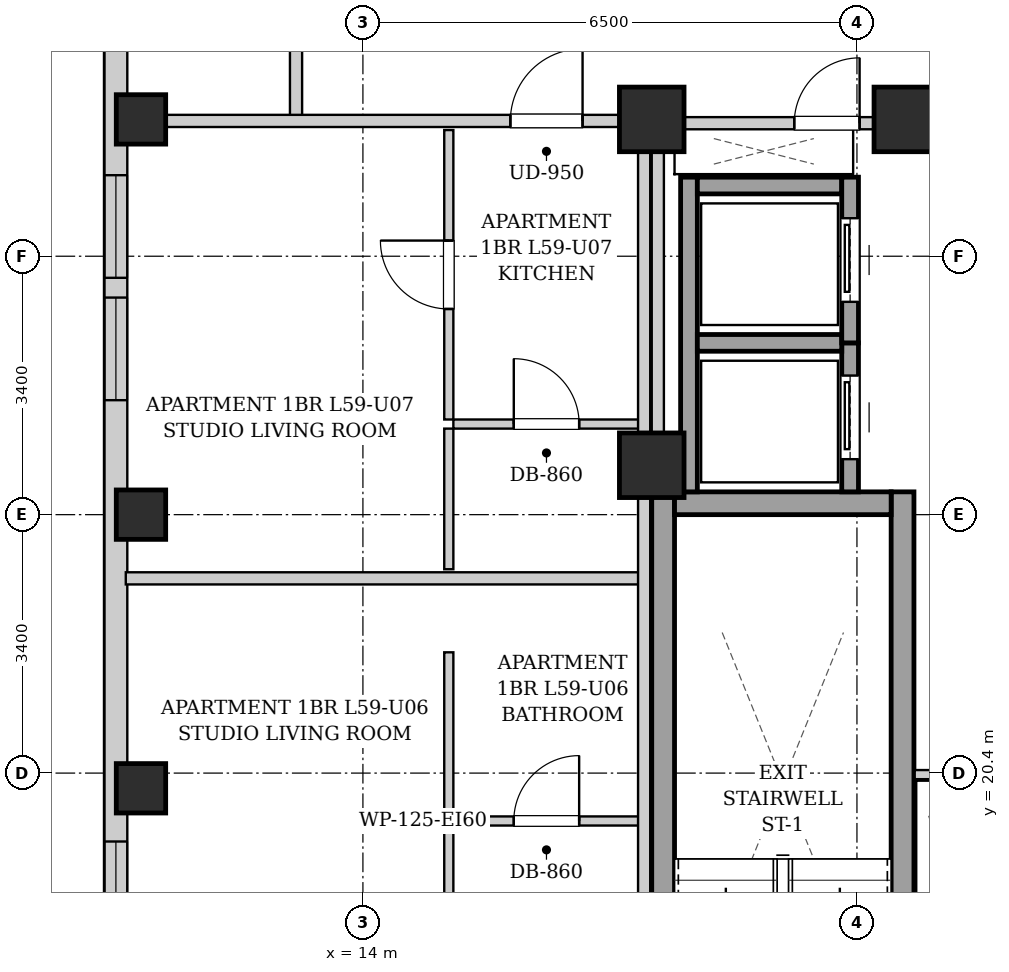
"""IFC4 building model, lengths in metres.
Left out: names, types, materials, properties, quantities, classifications, styles, units other than length and angle.
Written with IfcOpenShell. Run it as: python <this file> out.ifc"""

import sys

from ifc_helpers import new_model, si_unit, direction, frame, frame_2d, origin, origin_2d, place, context, subcontext, project, spatial, rectangle, extrude, element, fill, save


model = new_model("IFC4")
c1 = context("Model", 3, precision=1e-05, world=origin(), true_north=direction((0.0, 1.0)))
c2 = subcontext(c1, "Body", "Model", "MODEL_VIEW")
j1 = project(units=[si_unit("LENGTHUNIT", "METRE"), si_unit("PLANEANGLEUNIT", "RADIAN")], contexts=[c1])
p1 = place(None, origin())
s1 = spatial("IfcSite", under=j1, at=p1, CompositionType="ELEMENT")
p2 = place(p1, origin())
s2 = spatial("IfcBuilding", under=s1, at=p2, CompositionType="ELEMENT")
p3 = place(p2, frame((0.0, 0.0, 204.1)))
s3 = spatial("IfcBuildingStorey", under=s2, at=p3, CompositionType="ELEMENT", Elevation=204.1)
for number, where, z_axis, x_axis in (
    (1, (11.08, 20.2, 0.0), (0.0, 0.0, 1.0), (1.0, 0.0, 0.0)),
    (2, (11.08, 23.8, 0.0), (0.0, 0.0, 1.0), (1.0, 0.0, 0.0)),
    (3, (11.08, 29.0, 0.0), (0.0, 0.0, 1.0), (1.0, 0.0, 0.0)),
):
    element("IfcColumn", number, at=place(p3, frame(where, z_axis=z_axis, x_axis=x_axis)), inside=s3, PredefinedType="COLUMN", context=c2, shape_type="SweptSolid", body=[
        extrude(rectangle(XDim=0.65, YDim=0.65, at=origin_2d()), origin(), (0.0, 0.0, 1.0), 3.3),
    ])
for number, where, z_axis, x_axis in (
    (4, (17.8, 29.0, 0.0), (0.0, 0.0, 1.0), (1.0, 0.0, 0.0)),
    (5, (21.15, 29.0, 0.0), (0.0, 0.0, 1.0), (1.0, 0.0, 0.0)),
    (6, (17.8, 24.45, 0.0), (0.0, 0.0, 1.0), (1.0, 0.0, 0.0)),
):
    element("IfcColumn", number, at=place(p3, frame(where, z_axis=z_axis, x_axis=x_axis)), inside=s3, PredefinedType="COLUMN", context=c2, shape_type="SweptSolid", body=[
        extrude(rectangle(XDim=0.85, YDim=0.85, at=origin_2d()), origin(), (0.0, 0.0, 1.0), 3.3),
    ])
p4 = place(p3, frame((10.75, 6.3, 0.0), z_axis=(0.0, 0.0, 1.0), x_axis=(0.0, 1.0, 0.0)))
e7 = element("IfcWall", 7, at=p4, inside=s3, PredefinedType="SOLIDWALL", context=c2, shape_type="SweptSolid", body=[
    extrude(rectangle(XDim=31.4, YDim=0.3, at=frame_2d((15.7, 0.0))), origin(), (0.0, 0.0, 1.0), 3.04),
])
p5 = place(p4, frame((1.504, 0.0, 0.55)))
e8 = element("IfcOpeningElement", 8, at=p5, cuts=e7, PredefinedType="OPENING", context=c2, shape_type="SweptSolid", body=[
    extrude(rectangle(XDim=1.35, YDim=1.2, at=frame_2d((0.675, 0.6))), frame((0.0, 0.16, 0.0), z_axis=(0.0, -1.0, 0.0), x_axis=(1.0, 0.0, 0.0)), (0.0, 0.0, 1.0), 0.32),
])
p6 = place(p4, frame((28.546, 0.0, 0.55)))
e9 = element("IfcOpeningElement", 9, at=p6, cuts=e7, PredefinedType="OPENING", context=c2, shape_type="SweptSolid", body=[
    extrude(rectangle(XDim=1.35, YDim=1.2, at=frame_2d((0.675, 0.6))), frame((0.0, 0.16, 0.0), z_axis=(0.0, -1.0, 0.0), x_axis=(1.0, 0.0, 0.0)), (0.0, 0.0, 1.0), 0.32),
])
p7 = place(p4, frame((11.85, 0.0, 0.55)))
e10 = element("IfcOpeningElement", 10, at=p7, cuts=e7, PredefinedType="OPENING", context=c2, shape_type="SweptSolid", body=[
    extrude(rectangle(XDim=1.35, YDim=1.2, at=frame_2d((0.675, 0.6))), frame((0.0, 0.16, 0.0), z_axis=(0.0, -1.0, 0.0), x_axis=(1.0, 0.0, 0.0)), (0.0, 0.0, 1.0), 0.32),
])
p8 = place(p4, frame((9.185, 0.0, 0.55)))
e11 = element("IfcOpeningElement", 11, at=p8, cuts=e7, PredefinedType="OPENING", context=c2, shape_type="SweptSolid", body=[
    extrude(rectangle(XDim=1.35, YDim=1.2, at=frame_2d((0.675, 0.6))), frame((0.0, 0.16, 0.0), z_axis=(0.0, -1.0, 0.0), x_axis=(1.0, 0.0, 0.0)), (0.0, 0.0, 1.0), 0.32),
])
p9 = place(p4, frame((19.006, 0.0, 0.55)))
e12 = element("IfcOpeningElement", 12, at=p9, cuts=e7, PredefinedType="OPENING", context=c2, shape_type="SweptSolid", body=[
    extrude(rectangle(XDim=1.35, YDim=1.2, at=frame_2d((0.675, 0.6))), frame((0.0, 0.16, 0.0), z_axis=(0.0, -1.0, 0.0), x_axis=(1.0, 0.0, 0.0)), (0.0, 0.0, 1.0), 0.32),
])
p10 = place(p4, frame((20.616, 0.0, 0.55)))
e13 = element("IfcOpeningElement", 13, at=p10, cuts=e7, PredefinedType="OPENING", context=c2, shape_type="SweptSolid", body=[
    extrude(rectangle(XDim=1.35, YDim=1.2, at=frame_2d((0.675, 0.6))), frame((0.0, 0.16, 0.0), z_axis=(0.0, -1.0, 0.0), x_axis=(1.0, 0.0, 0.0)), (0.0, 0.0, 1.0), 0.32),
])
for number, where, z_axis, x_axis in (
    (14, (17.95, 15.1, 0.0), (0.0, 0.0, 1.0), (0.0, 1.0, 0.0)),
    (15, (21.1, 15.1, 0.0), (0.0, 0.0, 1.0), (0.0, 1.0, 0.0)),
):
    element("IfcWall", number, at=place(p3, frame(where, z_axis=z_axis, x_axis=x_axis)), inside=s3, PredefinedType="SHEAR", context=c2, shape_type="SweptSolid", body=[
        extrude(rectangle(XDim=9.0, YDim=0.3, at=frame_2d((4.5, 0.0))), origin(), (0.0, 0.0, 1.0), 3.04),
    ])
p11 = place(p3, frame((18.1, 23.95, 0.0), z_axis=(0.0, 0.0, 1.0), x_axis=(1.0, 0.0, 0.0)))
e16 = element("IfcWall", 16, at=p11, inside=s3, PredefinedType="SHEAR", context=c2, shape_type="SweptSolid", body=[
    extrude(rectangle(XDim=2.85, YDim=0.3, at=frame_2d((1.425, 0.0))), origin(), (0.0, 0.0, 1.0), 3.04),
])
p12 = place(p3, frame((18.29, 24.1, 0.0), z_axis=(0.0, 0.0, 1.0), x_axis=(0.0, 1.0, 0.0)))
e17 = element("IfcWall", 17, at=p12, inside=s3, PredefinedType="SHEAR", context=c2, shape_type="SweptSolid", body=[
    extrude(rectangle(XDim=4.14, YDim=0.22, at=frame_2d((2.07, 0.0))), origin(), (0.0, 0.0, 1.0), 3.04),
])
p13 = place(p3, frame((20.41, 24.1, 0.0), z_axis=(0.0, 0.0, 1.0), x_axis=(0.0, 1.0, 0.0)))
e18 = element("IfcWall", 18, at=p13, inside=s3, PredefinedType="SHEAR", context=c2, shape_type="SweptSolid", body=[
    extrude(rectangle(XDim=1.96, YDim=0.22, at=frame_2d((0.98, 0.0))), origin(), (0.0, 0.0, 1.0), 3.04),
])
p14 = place(p13, frame((0.43, 0.0, 0.0)))
e19 = element("IfcOpeningElement", 19, at=p14, cuts=e18, PredefinedType="OPENING", context=c2, shape_type="SweptSolid", body=[
    extrude(rectangle(XDim=1.1, YDim=2.15, at=frame_2d((0.55, 1.075))), frame((0.0, 0.12, 0.0), z_axis=(0.0, -1.0, 0.0), x_axis=(1.0, 0.0, 0.0)), (0.0, 0.0, 1.0), 0.24),
])
for number, where, z_axis, x_axis in (
    (20, (18.4, 26.06, 0.0), (0.0, 0.0, 1.0), (1.0, 0.0, 0.0)),
    (21, (18.4, 28.13, 0.0), (0.0, 0.0, 1.0), (1.0, 0.0, 0.0)),
):
    element("IfcWall", number, at=place(p3, frame(where, z_axis=z_axis, x_axis=x_axis)), inside=s3, PredefinedType="SHEAR", context=c2, shape_type="SweptSolid", body=[
        extrude(rectangle(XDim=1.9, YDim=0.22, at=frame_2d((0.95, 0.0))), origin(), (0.0, 0.0, 1.0), 3.04),
    ])
p15 = place(p3, frame((20.41, 26.06, 0.0), z_axis=(0.0, 0.0, 1.0), x_axis=(0.0, 1.0, 0.0)))
e22 = element("IfcWall", 22, at=p15, inside=s3, PredefinedType="SHEAR", context=c2, shape_type="SweptSolid", body=[
    extrude(rectangle(XDim=2.18, YDim=0.22, at=frame_2d((1.09, 0.0))), origin(), (0.0, 0.0, 1.0), 3.04),
])
p16 = place(p15, frame((0.54, 0.0, 0.0)))
e23 = element("IfcOpeningElement", 23, at=p16, cuts=e22, PredefinedType="OPENING", context=c2, shape_type="SweptSolid", body=[
    extrude(rectangle(XDim=1.1, YDim=2.15, at=frame_2d((0.55, 1.075))), frame((0.0, 0.12, 0.0), z_axis=(0.0, -1.0, 0.0), x_axis=(1.0, 0.0, 0.0)), (0.0, 0.0, 1.0), 0.24),
])
p17 = place(p3, frame((17.88, 24.12, 0.0), z_axis=(0.0, 0.0, 1.0), x_axis=(0.0, 1.0, 0.0)))
e24 = element("IfcWall", 24, at=p17, inside=s3, PredefinedType="PARTITIONING", context=c2, shape_type="SweptSolid", body=[
    extrude(rectangle(XDim=4.76, YDim=0.16, at=frame_2d((2.38, 0.0))), origin(), (0.0, 0.0, 1.0), 3.04),
])
p18 = place(p3, frame((17.96, 28.95, 0.0), z_axis=(0.0, 0.0, 1.0), x_axis=(1.0, 0.0, 0.0)))
e25 = element("IfcWall", 25, at=p18, inside=s3, PredefinedType="PARTITIONING", context=c2, shape_type="SweptSolid", body=[
    extrude(rectangle(XDim=4.29, YDim=0.16, at=frame_2d((2.145, 0.0))), origin(), (0.0, 0.0, 1.0), 2.556),
])
p19 = place(p18, frame((1.715, 0.0, 0.0)))
e26 = element("IfcOpeningElement", 26, at=p19, cuts=e25, PredefinedType="OPENING", context=c2, shape_type="SweptSolid", body=[
    extrude(rectangle(XDim=0.86, YDim=2.05, at=frame_2d((0.43, 1.025))), frame((0.0, 0.09, 0.0), z_axis=(0.0, -1.0, 0.0), x_axis=(1.0, 0.0, 0.0)), (0.0, 0.0, 1.0), 0.18),
])
p20 = place(p3, frame((22.28, 20.38, 0.0), z_axis=(0.0, 0.0, 1.0), x_axis=(-1.0, 0.0, 0.0)))
e27 = element("IfcWall", 27, at=p20, inside=s3, PredefinedType="PARTITIONING", context=c2, shape_type="SweptSolid", body=[
    extrude(rectangle(XDim=1.02, YDim=0.12, at=frame_2d((0.51, 0.0))), origin(), (0.0, 0.0, 1.0), 3.04),
])
p21 = place(p3, frame((13.12, 28.98, 0.0), z_axis=(0.0, 0.0, 1.0), x_axis=(0.0, 1.0, 0.0)))
e28 = element("IfcWall", 28, at=p21, inside=s3, PredefinedType="PARTITIONING", context=c2, shape_type="SweptSolid", body=[
    extrude(rectangle(XDim=1.58, YDim=0.16, at=frame_2d((0.79, 0.0))), origin(), (0.0, 0.0, 1.0), 3.04),
])
p22 = place(p3, frame((10.88, 22.962, 0.0), z_axis=(0.0, 0.0, 1.0), x_axis=(1.0, 0.0, 0.0)))
e29 = element("IfcWall", 29, at=p22, inside=s3, PredefinedType="PARTITIONING", context=c2, shape_type="SweptSolid", body=[
    extrude(rectangle(XDim=6.76, YDim=0.16, at=frame_2d((3.38, 0.0))), origin(), (0.0, 0.0, 1.0), 3.04),
])
p23 = place(p3, frame((15.19, 19.77, 0.0), z_axis=(0.0, 0.0, 1.0), x_axis=(1.0, 0.0, 0.0)))
e30 = element("IfcWall", 30, at=p23, inside=s3, PredefinedType="PARTITIONING", context=c2, shape_type="SweptSolid", body=[
    extrude(rectangle(XDim=2.45, YDim=0.12, at=frame_2d((1.225, 0.0))), origin(), (0.0, 0.0, 1.0), 3.04),
])
p24 = place(p23, frame((0.795, 0.0, 0.0)))
e31 = element("IfcOpeningElement", 31, at=p24, cuts=e30, PredefinedType="OPENING", context=c2, shape_type="SweptSolid", body=[
    extrude(rectangle(XDim=0.86, YDim=2.05, at=frame_2d((0.43, 1.025))), frame((0.0, 0.07, 0.0), z_axis=(0.0, -1.0, 0.0), x_axis=(1.0, 0.0, 0.0)), (0.0, 0.0, 1.0), 0.14),
])
p25 = place(p3, frame((15.13, 19.83, 0.0), z_axis=(0.0, 0.0, 1.0), x_axis=(0.0, 1.0, 0.0)))
e32 = element("IfcWall", 32, at=p25, inside=s3, PredefinedType="PARTITIONING", context=c2, shape_type="SweptSolid", body=[
    extrude(rectangle(XDim=2.159, YDim=0.12, at=frame_2d((1.08, 0.0))), origin(), (0.0, 0.0, 1.0), 3.04),
])
p26 = place(p3, frame((15.13, 15.21, 0.0), z_axis=(0.0, 0.0, 1.0), x_axis=(0.0, 1.0, 0.0)))
e33 = element("IfcWall", 33, at=p26, inside=s3, PredefinedType="PARTITIONING", context=c2, shape_type="SweptSolid", body=[
    extrude(rectangle(XDim=4.5, YDim=0.12, at=frame_2d((2.25, 0.0))), origin(), (0.0, 0.0, 1.0), 3.04),
])
p27 = place(p26, frame((1.8, 0.0, 0.0)))
e34 = element("IfcOpeningElement", 34, at=p27, cuts=e33, PredefinedType="OPENING", context=c2, shape_type="SweptSolid", body=[
    extrude(rectangle(XDim=0.9, YDim=2.05, at=frame_2d((0.45, 1.025))), frame((0.0, 0.07, 0.0), z_axis=(0.0, -1.0, 0.0), x_axis=(1.0, 0.0, 0.0)), (0.0, 0.0, 1.0), 0.14),
])
p28 = place(p3, frame((10.88, 28.98, 0.0), z_axis=(0.0, 0.0, 1.0), x_axis=(1.0, 0.0, 0.0)))
e35 = element("IfcWall", 35, at=p28, inside=s3, PredefinedType="PARTITIONING", context=c2, shape_type="SweptSolid", body=[
    extrude(rectangle(XDim=6.88, YDim=0.16, at=frame_2d((3.44, 0.0))), origin(), (0.0, 0.0, 1.0), 2.556),
])
p29 = place(p28, frame((5.06, 0.0, 0.0)))
e36 = element("IfcOpeningElement", 36, at=p29, cuts=e35, PredefinedType="OPENING", context=c2, shape_type="SweptSolid", body=[
    extrude(rectangle(XDim=0.95, YDim=2.1, at=frame_2d((0.475, 1.05))), frame((0.0, 0.09, 0.0), z_axis=(0.0, -1.0, 0.0), x_axis=(1.0, 0.0, 0.0)), (0.0, 0.0, 1.0), 0.18),
])
p30 = place(p3, frame((15.19, 24.992, 0.0), z_axis=(0.0, 0.0, 1.0), x_axis=(1.0, 0.0, 0.0)))
e37 = element("IfcWall", 37, at=p30, inside=s3, PredefinedType="PARTITIONING", context=c2, shape_type="SweptSolid", body=[
    extrude(rectangle(XDim=2.45, YDim=0.12, at=frame_2d((1.225, 0.0))), origin(), (0.0, 0.0, 1.0), 3.04),
])
p31 = place(p30, frame((0.795, 0.0, 0.0)))
e38 = element("IfcOpeningElement", 38, at=p31, cuts=e37, PredefinedType="OPENING", context=c2, shape_type="SweptSolid", body=[
    extrude(rectangle(XDim=0.86, YDim=2.05, at=frame_2d((0.43, 1.025))), frame((0.0, 0.07, 0.0), z_axis=(0.0, -1.0, 0.0), x_axis=(1.0, 0.0, 0.0)), (0.0, 0.0, 1.0), 0.14),
])
p32 = place(p3, frame((15.13, 23.082, 0.0), z_axis=(0.0, 0.0, 1.0), x_axis=(0.0, 1.0, 0.0)))
e39 = element("IfcWall", 39, at=p32, inside=s3, PredefinedType="PARTITIONING", context=c2, shape_type="SweptSolid", body=[
    extrude(rectangle(XDim=1.85, YDim=0.12, at=frame_2d((0.925, 0.0))), origin(), (0.0, 0.0, 1.0), 3.04),
])
p33 = place(p3, frame((15.13, 25.052, 0.0), z_axis=(0.0, 0.0, 1.0), x_axis=(0.0, 1.0, 0.0)))
e40 = element("IfcWall", 40, at=p33, inside=s3, PredefinedType="PARTITIONING", context=c2, shape_type="SweptSolid", body=[
    extrude(rectangle(XDim=3.808, YDim=0.12, at=frame_2d((1.904, 0.0))), origin(), (0.0, 0.0, 1.0), 3.04),
])
p34 = place(p33, frame((1.454, 0.0, 0.0)))
e41 = element("IfcOpeningElement", 41, at=p34, cuts=e40, PredefinedType="OPENING", context=c2, shape_type="SweptSolid", body=[
    extrude(rectangle(XDim=0.9, YDim=2.05, at=frame_2d((0.45, 1.025))), frame((0.0, 0.07, 0.0), z_axis=(0.0, -1.0, 0.0), x_axis=(1.0, 0.0, 0.0)), (0.0, 0.0, 1.0), 0.14),
])
p35 = place(p3, frame((17.7, 15.02, 0.0), z_axis=(0.0, 0.0, 1.0), x_axis=(0.0, 1.0, 0.0)))
e42 = element("IfcWall", 42, at=p35, inside=s3, PredefinedType="PARTITIONING", context=c2, shape_type="SweptSolid", body=[
    extrude(rectangle(XDim=13.98, YDim=0.16, at=frame_2d((6.99, 0.0))), origin(), (0.0, 0.0, 1.0), 3.04),
])
p36 = place(p14, origin())
e43 = element("IfcDoor", 43, at=p36, inside=s3, OperationType="SLIDING_TO_LEFT", PredefinedType="DOOR", context=c2, shape_type="SweptSolid", body=[
    extrude(rectangle(XDim=1.1, YDim=2.15, at=frame_2d((0.55, 1.075))), frame((0.0, 0.025, 0.0), z_axis=(0.0, -1.0, 0.0), x_axis=(1.0, 0.0, 0.0)), (0.0, 0.0, 1.0), 0.05),
])
fill(e19, e43)
p37 = place(p16, origin())
e44 = element("IfcDoor", 44, at=p37, inside=s3, OperationType="SLIDING_TO_LEFT", PredefinedType="DOOR", context=c2, shape_type="SweptSolid", body=[
    extrude(rectangle(XDim=1.1, YDim=2.15, at=frame_2d((0.55, 1.075))), frame((0.0, 0.025, 0.0), z_axis=(0.0, -1.0, 0.0), x_axis=(1.0, 0.0, 0.0)), (0.0, 0.0, 1.0), 0.05),
])
fill(e23, e44)
p38 = place(p19, origin())
e45 = element("IfcDoor", 45, at=p38, inside=s3, OperationType="SINGLE_SWING_RIGHT", PredefinedType="DOOR", context=c2, shape_type="SweptSolid", body=[
    extrude(rectangle(XDim=0.86, YDim=2.05, at=frame_2d((0.43, 1.025))), frame((0.0, 0.025, 0.0), z_axis=(0.0, -1.0, 0.0), x_axis=(1.0, 0.0, 0.0)), (0.0, 0.0, 1.0), 0.05),
])
fill(e26, e45)
p39 = place(p24, origin())
e46 = element("IfcDoor", 46, at=p39, inside=s3, OperationType="SINGLE_SWING_RIGHT", PredefinedType="DOOR", context=c2, shape_type="SweptSolid", body=[
    extrude(rectangle(XDim=0.86, YDim=2.05, at=frame_2d((0.43, 1.025))), frame((0.0, 0.025, 0.0), z_axis=(0.0, -1.0, 0.0), x_axis=(1.0, 0.0, 0.0)), (0.0, 0.0, 1.0), 0.05),
])
fill(e31, e46)
p40 = place(p29, origin())
e47 = element("IfcDoor", 47, at=p40, inside=s3, OperationType="SINGLE_SWING_RIGHT", PredefinedType="DOOR", context=c2, shape_type="SweptSolid", body=[
    extrude(rectangle(XDim=0.95, YDim=2.1, at=frame_2d((0.475, 1.05))), frame((0.0, 0.025, 0.0), z_axis=(0.0, -1.0, 0.0), x_axis=(1.0, 0.0, 0.0)), (0.0, 0.0, 1.0), 0.05),
])
fill(e36, e47)
p41 = place(p31, origin())
e48 = element("IfcDoor", 48, at=p41, inside=s3, OperationType="SINGLE_SWING_LEFT", PredefinedType="DOOR", context=c2, shape_type="SweptSolid", body=[
    extrude(rectangle(XDim=0.86, YDim=2.05, at=frame_2d((0.43, 1.025))), frame((0.0, 0.025, 0.0), z_axis=(0.0, -1.0, 0.0), x_axis=(1.0, 0.0, 0.0)), (0.0, 0.0, 1.0), 0.05),
])
fill(e38, e48)
p42 = place(p34, origin())
e49 = element("IfcDoor", 49, at=p42, inside=s3, OperationType="SINGLE_SWING_RIGHT", PredefinedType="DOOR", context=c2, shape_type="SweptSolid", body=[
    extrude(rectangle(XDim=0.9, YDim=2.05, at=frame_2d((0.45, 1.025))), frame((0.0, 0.025, 0.0), z_axis=(0.0, -1.0, 0.0), x_axis=(1.0, 0.0, 0.0)), (0.0, 0.0, 1.0), 0.05),
])
fill(e41, e49)
p43 = place(p7, origin())
e50 = element("IfcWindow", 50, at=p43, inside=s3, PartitioningType="SINGLE_PANEL", PredefinedType="WINDOW", context=c2, shape_type="SweptSolid", body=[
    extrude(rectangle(XDim=1.35, YDim=1.2, at=frame_2d((0.675, 0.6))), frame((0.0, 0.03, 0.0), z_axis=(0.0, -1.0, 0.0), x_axis=(1.0, 0.0, 0.0)), (0.0, 0.0, 1.0), 0.06),
])
fill(e10, e50)
p44 = place(p9, origin())
e51 = element("IfcWindow", 51, at=p44, inside=s3, PartitioningType="SINGLE_PANEL", PredefinedType="WINDOW", context=c2, shape_type="SweptSolid", body=[
    extrude(rectangle(XDim=1.35, YDim=1.2, at=frame_2d((0.675, 0.6))), frame((0.0, 0.03, 0.0), z_axis=(0.0, -1.0, 0.0), x_axis=(1.0, 0.0, 0.0)), (0.0, 0.0, 1.0), 0.06),
])
fill(e12, e51)
p45 = place(p10, origin())
e52 = element("IfcWindow", 52, at=p45, inside=s3, PartitioningType="SINGLE_PANEL", PredefinedType="WINDOW", context=c2, shape_type="SweptSolid", body=[
    extrude(rectangle(XDim=1.35, YDim=1.2, at=frame_2d((0.675, 0.6))), frame((0.0, 0.03, 0.0), z_axis=(0.0, -1.0, 0.0), x_axis=(1.0, 0.0, 0.0)), (0.0, 0.0, 1.0), 0.06),
])
fill(e13, e52)
save(model, sys.argv[1])
